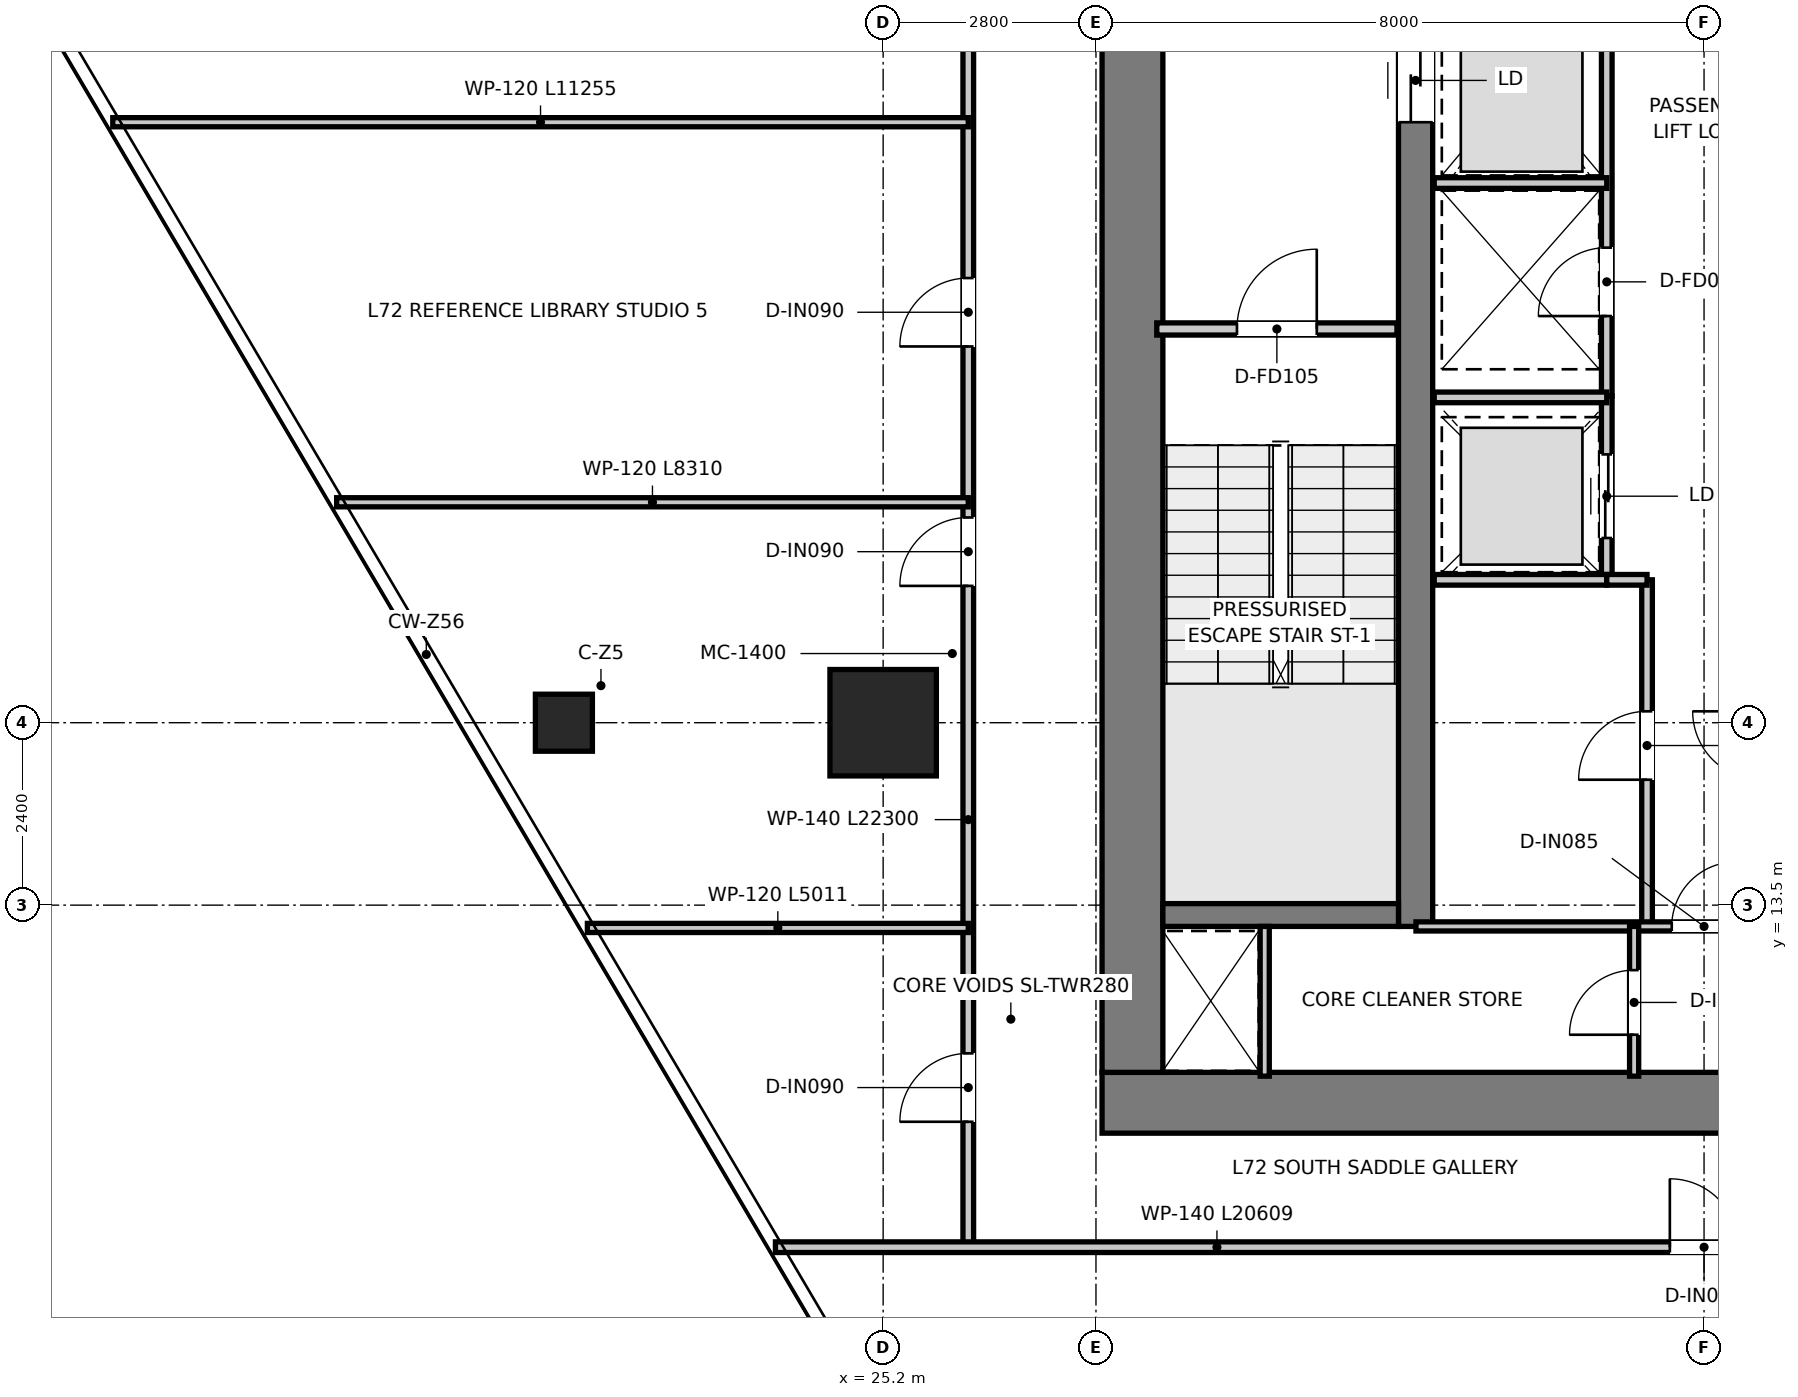
"""IFC4 building model, lengths in metres.
Left out: names, types, materials, properties, quantities, classifications, styles, units other than length and angle.
Written with IfcOpenShell. Run it as: python <this file> out.ifc"""

import sys

from ifc_helpers import new_model, si_unit, direction, frame, frame_2d, origin, origin_2d, place, context, subcontext, project, spatial, rectangle, extrude, source, transform, mapped, element, fill, save


model = new_model("IFC4")
c1 = context("Model", 3, precision=1e-05, world=origin(), true_north=direction((0.0, 1.0)))
c2 = subcontext(c1, "Body", "Model", "MODEL_VIEW")
j1 = project(units=[si_unit("LENGTHUNIT", "METRE"), si_unit("PLANEANGLEUNIT", "RADIAN")], contexts=[c1])
p1 = place(None, origin())
s1 = spatial("IfcSite", under=j1, at=p1, CompositionType="ELEMENT")
p2 = place(p1, origin())
s2 = spatial("IfcBuilding", under=s1, at=p2, CompositionType="ELEMENT")
p3 = place(p2, frame((0.0, 0.0, 295.05)))
s3 = spatial("IfcBuildingStorey", under=s2, at=p3, CompositionType="ELEMENT", Elevation=295.05)
p4 = place(p3, frame((28.08, 10.9, 0.0), z_axis=(0.0, 0.0, 1.0), x_axis=(1.0, 0.0, 0.0)))
e1 = element("IfcWall", 1, at=p4, inside=s3, PredefinedType="SHEAR", context=c2, shape_type="SweptSolid", body=[
    extrude(rectangle(XDim=15.84, YDim=0.8, at=frame_2d((7.92, 0.0))), origin(), (0.0, 0.0, 1.0), 3.95),
])
p5 = place(p3, frame((28.48, 11.3, 0.0), z_axis=(0.0, 0.0, 1.0), x_axis=(0.0, 1.0, 0.0)))
e2 = element("IfcWall", 2, at=p5, inside=s3, PredefinedType="SHEAR", context=c2, shape_type="SweptSolid", body=[
    extrude(rectangle(XDim=14.7, YDim=0.8, at=frame_2d((7.35, 0.0))), origin(), (0.0, 0.0, 1.0), 3.95),
])
p6 = place(p3, frame((32.205, 13.22, 0.0), z_axis=(0.0, 0.0, 1.0), x_axis=(0.0, 1.0, 0.0)))
e3 = element("IfcWall", 3, at=p6, inside=s3, PredefinedType="SHEAR", context=c2, shape_type="SweptSolid", body=[
    extrude(rectangle(XDim=12.78, YDim=0.45, at=frame_2d((6.39, 0.0))), origin(), (0.0, 0.0, 1.0), 3.95),
])
p7 = place(p6, frame((10.58, 0.0, 0.0)))
e4 = element("IfcOpeningElement", 4, at=p7, cuts=e3, PredefinedType="OPENING", context=c2, shape_type="SweptSolid", body=[
    extrude(rectangle(XDim=1.1, YDim=2.15, at=frame_2d((0.55, 1.075))), frame((0.0, 0.235, 0.0), z_axis=(0.0, -1.0, 0.0), x_axis=(1.0, 0.0, 0.0)), (0.0, 0.0, 1.0), 0.47),
])
p8 = place(p3, frame((28.88, 13.37, 0.0), z_axis=(0.0, 0.0, 1.0), x_axis=(1.0, 0.0, 0.0)))
e5 = element("IfcWall", 5, at=p8, inside=s3, PredefinedType="SHEAR", context=c2, shape_type="SweptSolid", body=[
    extrude(rectangle(XDim=3.1, YDim=0.3, at=frame_2d((1.55, 0.0))), origin(), (0.0, 0.0, 1.0), 3.95),
])
m1 = source(origin(), c2, "Body", "SweptSolid", [
    extrude(rectangle(XDim=1.4, YDim=1.4, at=origin_2d()), origin(), (0.0, 0.0, 1.0), 3.95),
])
p9 = place(p3, frame((25.2, 15.9, 0.0), z_axis=(0.0, 0.0, 1.0), x_axis=(1.0, 0.0, 0.0)))
e6 = element("IfcColumn", 6, at=p9, inside=s3, PredefinedType="USERDEFINED", context=c2, shape_type="MappedRepresentation", body=[
    mapped(m1, transform((0.0, 0.0, 0.0), x_axis=(1.0, 0.0, 0.0), y_axis=(0.0, 1.0, 0.0), z_axis=(0.0, 0.0, 1.0), scale=1.0)),
])
m2 = source(origin(), c2, "Body", "SweptSolid", [
    extrude(rectangle(XDim=0.75, YDim=0.75, at=origin_2d()), origin(), (0.0, 0.0, 1.0), 3.95),
])
p10 = place(p3, frame((21.0, 15.9, 0.0), z_axis=(0.0, 0.0, 1.0), x_axis=(1.0, 0.0, 0.0)))
e7 = element("IfcColumn", 7, at=p10, inside=s3, PredefinedType="COLUMN", context=c2, shape_type="MappedRepresentation", body=[
    mapped(m2, transform((0.0, 0.0, 0.0), x_axis=(1.0, 0.0, 0.0), y_axis=(0.0, 1.0, 0.0), z_axis=(0.0, 0.0, 1.0), scale=1.0)),
])
p11 = place(p3, frame((28.8, 21.08, 0.0), z_axis=(0.0, 0.0, 1.0), x_axis=(1.0, 0.0, 0.0)))
e8 = element("IfcWall", 8, at=p11, inside=s3, PredefinedType="PARTITIONING", context=c2, shape_type="SweptSolid", body=[
    extrude(rectangle(XDim=3.16, YDim=0.16, at=frame_2d((1.58, 0.0))), origin(), (0.0, 0.0, 1.0), 3.67),
])
p12 = place(p11, frame((1.055, 0.0, 0.0)))
e9 = element("IfcOpeningElement", 9, at=p12, cuts=e8, PredefinedType="OPENING", context=c2, shape_type="SweptSolid", body=[
    extrude(rectangle(XDim=1.05, YDim=2.1, at=frame_2d((0.525, 1.05))), frame((0.0, 0.09, 0.0), z_axis=(0.0, -1.0, 0.0), x_axis=(1.0, 0.0, 0.0)), (0.0, 0.0, 1.0), 0.18),
])
p13 = place(p3, frame((34.72, 20.2, 0.0), z_axis=(0.0, 0.0, 1.0), x_axis=(0.0, 1.0, 0.0)))
e10 = element("IfcWall", 10, at=p13, inside=s3, PredefinedType="PARTITIONING", context=c2, shape_type="SweptSolid", body=[
    extrude(rectangle(XDim=5.78, YDim=0.14, at=frame_2d((2.89, 0.0))), origin(), (0.0, 0.0, 1.0), 2.82),
])
p14 = place(p13, frame((1.05, 0.0, 0.0)))
e11 = element("IfcOpeningElement", 11, at=p14, cuts=e10, PredefinedType="OPENING", context=c2, shape_type="SweptSolid", body=[
    extrude(rectangle(XDim=0.9, YDim=2.1, at=frame_2d((0.45, 1.05))), frame((0.0, 0.08, 0.0), z_axis=(0.0, -1.0, 0.0), x_axis=(1.0, 0.0, 0.0)), (0.0, 0.0, 1.0), 0.16),
])
p15 = place(p3, frame((32.45, 23.0, 0.0), z_axis=(0.0, 0.0, 1.0), x_axis=(1.0, 0.0, 0.0)))
e12 = element("IfcWall", 12, at=p15, inside=s3, PredefinedType="PARTITIONING", context=c2, shape_type="SweptSolid", body=[
    extrude(rectangle(XDim=2.27, YDim=0.14, at=frame_2d((1.135, 0.0))), origin(), (0.0, 0.0, 1.0), 2.82),
])
p16 = place(p3, frame((34.72, 17.78, 0.0), z_axis=(0.0, 0.0, 1.0), x_axis=(0.0, 1.0, 0.0)))
e13 = element("IfcWall", 13, at=p16, inside=s3, PredefinedType="PARTITIONING", context=c2, shape_type="SweptSolid", body=[
    extrude(rectangle(XDim=2.42, YDim=0.14, at=frame_2d((1.21, 0.0))), origin(), (0.0, 0.0, 1.0), 3.67),
])
p17 = place(p16, frame((0.55, 0.0, 0.0)))
e14 = element("IfcOpeningElement", 14, at=p17, cuts=e13, PredefinedType="OPENING", context=c2, shape_type="SweptSolid", body=[
    extrude(rectangle(XDim=1.1, YDim=2.15, at=frame_2d((0.55, 1.075))), frame((0.0, 0.08, 0.0), z_axis=(0.0, -1.0, 0.0), x_axis=(1.0, 0.0, 0.0)), (0.0, 0.0, 1.0), 0.16),
])
for number, where, z_axis, x_axis in (
    (15, (32.45, 17.78, 0.0), (0.0, 0.0, 1.0), (1.0, 0.0, 0.0)),
    (16, (32.45, 20.18, 0.0), (0.0, 0.0, 1.0), (1.0, 0.0, 0.0)),
):
    element("IfcWall", number, at=place(p3, frame(where, z_axis=z_axis, x_axis=x_axis)), inside=s3, PredefinedType="PARTITIONING", context=c2, shape_type="SweptSolid", body=[
        extrude(rectangle(XDim=2.27, YDim=0.14, at=frame_2d((1.135, 0.0))), origin(), (0.0, 0.0, 1.0), 3.67),
    ])
p18 = place(p3, frame((35.25, 13.22, 0.0), z_axis=(0.0, 0.0, 1.0), x_axis=(0.0, 1.0, 0.0)))
e17 = element("IfcWall", 17, at=p18, inside=s3, PredefinedType="PARTITIONING", context=c2, shape_type="SweptSolid", body=[
    extrude(rectangle(XDim=4.56, YDim=0.14, at=frame_2d((2.28, 0.0))), origin(), (0.0, 0.0, 1.0), 3.67),
])
p19 = place(p18, frame((1.93, 0.0, 0.0)))
e18 = element("IfcOpeningElement", 18, at=p19, cuts=e17, PredefinedType="OPENING", context=c2, shape_type="SweptSolid", body=[
    extrude(rectangle(XDim=0.9, YDim=2.1, at=frame_2d((0.45, 1.05))), frame((0.0, 0.08, 0.0), z_axis=(0.0, -1.0, 0.0), x_axis=(1.0, 0.0, 0.0)), (0.0, 0.0, 1.0), 0.16),
])
p20 = place(p3, frame((34.72, 17.78, 0.0), z_axis=(0.0, 0.0, 1.0), x_axis=(1.0, 0.0, 0.0)))
e19 = element("IfcWall", 19, at=p20, inside=s3, PredefinedType="PARTITIONING", context=c2, shape_type="SweptSolid", body=[
    extrude(rectangle(XDim=0.53, YDim=0.14, at=frame_2d((0.265, 0.0))), origin(), (0.0, 0.0, 1.0), 3.67),
])
p21 = place(p3, frame((30.22, 11.25, 0.0), z_axis=(0.0, 0.0, 1.0), x_axis=(0.0, 1.0, 0.0)))
e20 = element("IfcWall", 20, at=p21, inside=s3, PredefinedType="PARTITIONING", context=c2, shape_type="SweptSolid", body=[
    extrude(rectangle(XDim=1.97, YDim=0.12, at=frame_2d((0.985, 0.0))), origin(), (0.0, 0.0, 1.0), 3.67),
])
p22 = place(p3, frame((32.21, 13.22, 0.0), z_axis=(0.0, 0.0, 1.0), x_axis=(1.0, 0.0, 0.0)))
e21 = element("IfcWall", 21, at=p22, inside=s3, PredefinedType="PARTITIONING", context=c2, shape_type="SweptSolid", body=[
    extrude(rectangle(XDim=7.58, YDim=0.12, at=frame_2d((3.79, 0.0))), origin(), (0.0, 0.0, 1.0), 3.67),
])
p23 = place(p22, frame((3.365, 0.0, 0.0)))
e22 = element("IfcOpeningElement", 22, at=p23, cuts=e21, PredefinedType="OPENING", context=c2, shape_type="SweptSolid", body=[
    extrude(rectangle(XDim=0.85, YDim=2.1, at=frame_2d((0.425, 1.05))), frame((0.0, 0.07, 0.0), z_axis=(0.0, -1.0, 0.0), x_axis=(1.0, 0.0, 0.0)), (0.0, 0.0, 1.0), 0.14),
])
p24 = place(p3, frame((35.08, 11.25, 0.0), z_axis=(0.0, 0.0, 1.0), x_axis=(0.0, 1.0, 0.0)))
e23 = element("IfcWall", 23, at=p24, inside=s3, PredefinedType="PARTITIONING", context=c2, shape_type="SweptSolid", body=[
    extrude(rectangle(XDim=1.97, YDim=0.12, at=frame_2d((0.985, 0.0))), origin(), (0.0, 0.0, 1.0), 3.67),
])
p25 = place(p24, frame((0.545, 0.0, 0.0)))
e24 = element("IfcOpeningElement", 24, at=p25, cuts=e23, PredefinedType="OPENING", context=c2, shape_type="SweptSolid", body=[
    extrude(rectangle(XDim=0.85, YDim=2.1, at=frame_2d((0.425, 1.05))), frame((0.0, 0.07, 0.0), z_axis=(0.0, -1.0, 0.0), x_axis=(1.0, 0.0, 0.0)), (0.0, 0.0, 1.0), 0.14),
])
p26 = place(p3, frame((26.32, 9.0, 0.0), z_axis=(0.0, 0.0, 1.0), x_axis=(0.0, 1.0, 0.0)))
e25 = element("IfcWall", 25, at=p26, inside=s3, PredefinedType="PARTITIONING", context=c2, shape_type="SweptSolid", body=[
    extrude(rectangle(XDim=19.66, YDim=0.14, at=frame_2d((9.83, 0.0))), origin(), (0.0, 0.0, 1.0), 3.13),
])
p27 = place(p26, frame((18.3, 0.0, 0.0)))
e26 = element("IfcOpeningElement", 26, at=p27, cuts=e25, PredefinedType="OPENING", context=c2, shape_type="SweptSolid", body=[
    extrude(rectangle(XDim=0.9, YDim=2.1, at=frame_2d((0.45, 1.05))), frame((0.0, 0.08, 0.0), z_axis=(0.0, -1.0, 0.0), x_axis=(1.0, 0.0, 0.0)), (0.0, 0.0, 1.0), 0.16),
])
p28 = place(p26, frame((1.65, 0.0, 0.0)))
e27 = element("IfcOpeningElement", 27, at=p28, cuts=e25, PredefinedType="OPENING", context=c2, shape_type="SweptSolid", body=[
    extrude(rectangle(XDim=0.9, YDim=2.1, at=frame_2d((0.45, 1.05))), frame((0.0, 0.08, 0.0), z_axis=(0.0, -1.0, 0.0), x_axis=(1.0, 0.0, 0.0)), (0.0, 0.0, 1.0), 0.16),
])
p29 = place(p26, frame((8.7, 0.0, 0.0)))
e28 = element("IfcOpeningElement", 28, at=p29, cuts=e25, PredefinedType="OPENING", context=c2, shape_type="SweptSolid", body=[
    extrude(rectangle(XDim=0.9, YDim=2.1, at=frame_2d((0.45, 1.05))), frame((0.0, 0.08, 0.0), z_axis=(0.0, -1.0, 0.0), x_axis=(1.0, 0.0, 0.0)), (0.0, 0.0, 1.0), 0.16),
])
p30 = place(p26, frame((11.85, 0.0, 0.0)))
e29 = element("IfcOpeningElement", 29, at=p30, cuts=e25, PredefinedType="OPENING", context=c2, shape_type="SweptSolid", body=[
    extrude(rectangle(XDim=0.9, YDim=2.1, at=frame_2d((0.45, 1.05))), frame((0.0, 0.08, 0.0), z_axis=(0.0, -1.0, 0.0), x_axis=(1.0, 0.0, 0.0)), (0.0, 0.0, 1.0), 0.16),
])
p31 = place(p26, frame((15.86, 0.0, 0.0)))
e30 = element("IfcOpeningElement", 30, at=p31, cuts=e25, PredefinedType="OPENING", context=c2, shape_type="SweptSolid", body=[
    extrude(rectangle(XDim=0.9, YDim=2.1, at=frame_2d((0.45, 1.05))), frame((0.0, 0.08, 0.0), z_axis=(0.0, -1.0, 0.0), x_axis=(1.0, 0.0, 0.0)), (0.0, 0.0, 1.0), 0.16),
])
p32 = place(p3, frame((23.783, 9.0, 0.0), z_axis=(0.0, 0.0, 1.0), x_axis=(1.0, 0.0, 0.0)))
e31 = element("IfcWall", 31, at=p32, inside=s3, PredefinedType="PARTITIONING", context=c2, shape_type="SweptSolid", body=[
    extrude(rectangle(XDim=20.609, YDim=0.14, at=frame_2d((10.304, 0.0))), origin(), (0.0, 0.0, 1.0), 3.67),
])
p33 = place(p32, frame((11.767, 0.0, 0.0)))
e32 = element("IfcOpeningElement", 32, at=p33, cuts=e31, PredefinedType="OPENING", context=c2, shape_type="SweptSolid", body=[
    extrude(rectangle(XDim=0.9, YDim=2.1, at=frame_2d((0.45, 1.05))), frame((0.0, 0.08, 0.0), z_axis=(0.0, -1.0, 0.0), x_axis=(1.0, 0.0, 0.0)), (0.0, 0.0, 1.0), 0.16),
])
p34 = place(p3, frame((21.309, 13.2, 0.0), z_axis=(0.0, 0.0, 1.0), x_axis=(1.0, 0.0, 0.0)))
e33 = element("IfcWall", 33, at=p34, inside=s3, PredefinedType="PARTITIONING", context=c2, shape_type="SweptSolid", body=[
    extrude(rectangle(XDim=5.011, YDim=0.12, at=frame_2d((2.505, 0.0))), origin(), (0.0, 0.0, 1.0), 3.18),
])
p35 = place(p3, frame((18.01, 18.8, 0.0), z_axis=(0.0, 0.0, 1.0), x_axis=(1.0, 0.0, 0.0)))
e34 = element("IfcWall", 34, at=p35, inside=s3, PredefinedType="PARTITIONING", context=c2, shape_type="SweptSolid", body=[
    extrude(rectangle(XDim=8.31, YDim=0.12, at=frame_2d((4.155, 0.0))), origin(), (0.0, 0.0, 1.0), 3.13),
])
p36 = place(p3, frame((15.065, 23.8, 0.0), z_axis=(0.0, 0.0, 1.0), x_axis=(1.0, 0.0, 0.0)))
e35 = element("IfcWall", 35, at=p36, inside=s3, PredefinedType="PARTITIONING", context=c2, shape_type="SweptSolid", body=[
    extrude(rectangle(XDim=11.255, YDim=0.12, at=frame_2d((5.627, 0.0))), origin(), (0.0, 0.0, 1.0), 3.13),
])
p37 = place(p12, origin())
e36 = element("IfcDoor", 36, at=p37, inside=s3, OperationType="SINGLE_SWING_RIGHT", PredefinedType="DOOR", context=c2, shape_type="SweptSolid", body=[
    extrude(rectangle(XDim=1.05, YDim=2.1, at=frame_2d((0.525, 1.05))), frame((0.0, 0.025, 0.0), z_axis=(0.0, -1.0, 0.0), x_axis=(1.0, 0.0, 0.0)), (0.0, 0.0, 1.0), 0.05),
])
fill(e9, e36)
p38 = place(p7, origin())
e37 = element("IfcDoor", 37, at=p38, inside=s3, OperationType="DOUBLE_DOOR_SLIDING", PredefinedType="DOOR", context=c2, shape_type="SweptSolid", body=[
    extrude(rectangle(XDim=1.1, YDim=2.15, at=frame_2d((0.55, 1.075))), frame((0.0, 0.025, 0.0), z_axis=(0.0, -1.0, 0.0), x_axis=(1.0, 0.0, 0.0)), (0.0, 0.0, 1.0), 0.05),
])
fill(e4, e37)
p39 = place(p14, origin())
e38 = element("IfcDoor", 38, at=p39, inside=s3, OperationType="SINGLE_SWING_LEFT", PredefinedType="DOOR", context=c2, shape_type="SweptSolid", body=[
    extrude(rectangle(XDim=0.9, YDim=2.1, at=frame_2d((0.45, 1.05))), frame((0.0, 0.025, 0.0), z_axis=(0.0, -1.0, 0.0), x_axis=(1.0, 0.0, 0.0)), (0.0, 0.0, 1.0), 0.05),
])
fill(e11, e38)
p40 = place(p17, origin())
e39 = element("IfcDoor", 39, at=p40, inside=s3, OperationType="DOUBLE_DOOR_SLIDING", PredefinedType="DOOR", context=c2, shape_type="SweptSolid", body=[
    extrude(rectangle(XDim=1.1, YDim=2.15, at=frame_2d((0.55, 1.075))), frame((0.0, 0.025, 0.0), z_axis=(0.0, -1.0, 0.0), x_axis=(1.0, 0.0, 0.0)), (0.0, 0.0, 1.0), 0.05),
])
fill(e14, e39)
p41 = place(p19, origin())
e40 = element("IfcDoor", 40, at=p41, inside=s3, OperationType="SINGLE_SWING_LEFT", PredefinedType="DOOR", context=c2, shape_type="SweptSolid", body=[
    extrude(rectangle(XDim=0.9, YDim=2.1, at=frame_2d((0.45, 1.05))), frame((0.0, 0.025, 0.0), z_axis=(0.0, -1.0, 0.0), x_axis=(1.0, 0.0, 0.0)), (0.0, 0.0, 1.0), 0.05),
])
fill(e18, e40)
p42 = place(p23, origin())
e41 = element("IfcDoor", 41, at=p42, inside=s3, OperationType="SINGLE_SWING_RIGHT", PredefinedType="DOOR", context=c2, shape_type="SweptSolid", body=[
    extrude(rectangle(XDim=0.85, YDim=2.1, at=frame_2d((0.425, 1.05))), frame((0.0, 0.025, 0.0), z_axis=(0.0, -1.0, 0.0), x_axis=(1.0, 0.0, 0.0)), (0.0, 0.0, 1.0), 0.05),
])
fill(e22, e41)
p43 = place(p25, origin())
e42 = element("IfcDoor", 42, at=p43, inside=s3, OperationType="SINGLE_SWING_LEFT", PredefinedType="DOOR", context=c2, shape_type="SweptSolid", body=[
    extrude(rectangle(XDim=0.85, YDim=2.1, at=frame_2d((0.425, 1.05))), frame((0.0, 0.025, 0.0), z_axis=(0.0, -1.0, 0.0), x_axis=(1.0, 0.0, 0.0)), (0.0, 0.0, 1.0), 0.05),
])
fill(e24, e42)
p44 = place(p28, origin())
e43 = element("IfcDoor", 43, at=p44, inside=s3, OperationType="SINGLE_SWING_LEFT", PredefinedType="DOOR", context=c2, shape_type="SweptSolid", body=[
    extrude(rectangle(XDim=0.9, YDim=2.1, at=frame_2d((0.45, 1.05))), frame((0.0, 0.025, 0.0), z_axis=(0.0, -1.0, 0.0), x_axis=(1.0, 0.0, 0.0)), (0.0, 0.0, 1.0), 0.05),
])
fill(e27, e43)
p45 = place(p29, origin())
e44 = element("IfcDoor", 44, at=p45, inside=s3, OperationType="SINGLE_SWING_LEFT", PredefinedType="DOOR", context=c2, shape_type="SweptSolid", body=[
    extrude(rectangle(XDim=0.9, YDim=2.1, at=frame_2d((0.45, 1.05))), frame((0.0, 0.025, 0.0), z_axis=(0.0, -1.0, 0.0), x_axis=(1.0, 0.0, 0.0)), (0.0, 0.0, 1.0), 0.05),
])
fill(e28, e44)
p46 = place(p30, origin())
e45 = element("IfcDoor", 45, at=p46, inside=s3, OperationType="SINGLE_SWING_LEFT", PredefinedType="DOOR", context=c2, shape_type="SweptSolid", body=[
    extrude(rectangle(XDim=0.9, YDim=2.1, at=frame_2d((0.45, 1.05))), frame((0.0, 0.025, 0.0), z_axis=(0.0, -1.0, 0.0), x_axis=(1.0, 0.0, 0.0)), (0.0, 0.0, 1.0), 0.05),
])
fill(e29, e45)
p47 = place(p33, origin())
e46 = element("IfcDoor", 46, at=p47, inside=s3, OperationType="SINGLE_SWING_LEFT", PredefinedType="DOOR", context=c2, shape_type="SweptSolid", body=[
    extrude(rectangle(XDim=0.9, YDim=2.1, at=frame_2d((0.45, 1.05))), frame((0.0, 0.025, 0.0), z_axis=(0.0, -1.0, 0.0), x_axis=(1.0, 0.0, 0.0)), (0.0, 0.0, 1.0), 0.05),
])
fill(e32, e46)
save(model, sys.argv[1])
